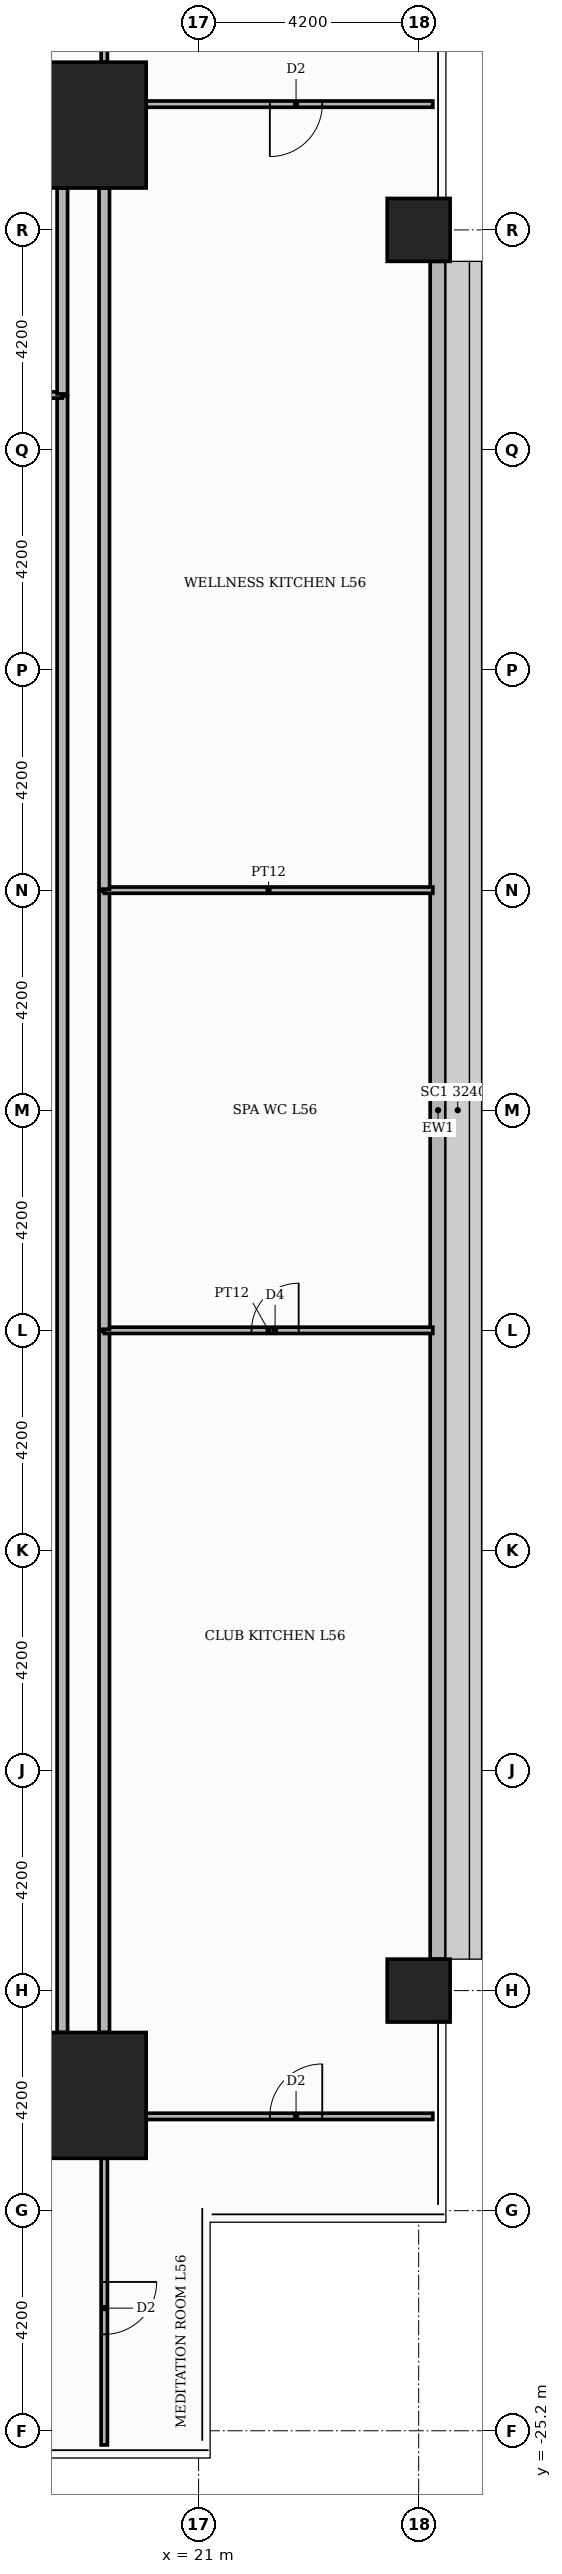
"""IFC4 building model, lengths in metres.
Left out: names, types, materials, properties, quantities, classifications, styles, units other than length and angle.
Written with IfcOpenShell. Run it as: python <this file> out.ifc"""

import sys

from ifc_helpers import new_model, si_unit, direction, frame, frame_2d, origin, origin_2d, place, context, subcontext, project, spatial, rectangle, extrude, element, fill, save


model = new_model("IFC4")
c1 = context("Model", 3, precision=1e-05, world=origin(), true_north=direction((0.0, 1.0)))
c2 = subcontext(c1, "Body", "Model", "MODEL_VIEW")
j1 = project(units=[si_unit("LENGTHUNIT", "METRE"), si_unit("PLANEANGLEUNIT", "RADIAN")], contexts=[c1])
p1 = place(None, origin())
s1 = spatial("IfcSite", under=j1, at=p1, CompositionType="ELEMENT")
p2 = place(p1, origin())
s2 = spatial("IfcBuilding", under=s1, at=p2, CompositionType="ELEMENT")
p3 = place(p2, frame((0.0, 0.0, 235.2)))
s3 = spatial("IfcBuildingStorey", under=s2, at=p3, CompositionType="ELEMENT", Elevation=235.2)
for number, where, z_axis, x_axis in (
    (1, (18.8, 18.8, 0.0), (0.0, 0.0, 1.0), (1.0, 0.0, 0.0)),
    (2, (18.8, -18.8, 0.0), (0.0, 0.0, 1.0), (1.0, 0.0, 0.0)),
):
    element("IfcColumn", number, at=place(p3, frame(where, z_axis=z_axis, x_axis=x_axis)), inside=s3, PredefinedType="COLUMN", context=c2, shape_type="SweptSolid", body=[
        extrude(rectangle(XDim=2.4, YDim=2.4, at=origin_2d()), origin(), (0.0, 0.0, 1.0), 5.4),
    ])
for number, where, z_axis, x_axis in (
    (3, (25.2, 16.8, 0.0), (0.0, 0.0, 1.0), (1.0, 0.0, 0.0)),
    (4, (25.2, -16.8, 0.0), (0.0, 0.0, 1.0), (1.0, 0.0, 0.0)),
):
    element("IfcColumn", number, at=place(p3, frame(where, z_axis=z_axis, x_axis=x_axis)), inside=s3, PredefinedType="COLUMN", context=c2, shape_type="SweptSolid", body=[
        extrude(rectangle(XDim=1.2, YDim=1.2, at=origin_2d()), origin(), (0.0, 0.0, 1.0), 5.4),
    ])
p4 = place(p3, frame((25.57, -16.2, 0.0), z_axis=(0.0, 0.0, 1.0), x_axis=(0.0, 1.0, 0.0)))
e5 = element("IfcWall", 5, at=p4, inside=s3, PredefinedType="STANDARD", context=c2, shape_type="SweptSolid", body=[
    extrude(rectangle(XDim=32.4, YDim=0.3, at=frame_2d((16.2, 0.0))), origin(), (0.0, 0.0, 1.0), 4.98),
])
p5 = place(p3, frame((19.2, -25.47, 0.0), z_axis=(0.0, 0.0, 1.0), x_axis=(0.0, 1.0, 0.0)))
e6 = element("IfcWall", 6, at=p5, inside=s3, PredefinedType="PARTITIONING", context=c2, shape_type="SweptSolid", body=[
    extrude(rectangle(XDim=5.47, YDim=0.12, at=frame_2d((2.735, 0.0))), origin(), (0.0, 0.0, 1.0), 4.98),
])
p6 = place(p5, frame((2.11, 0.0, 0.0)))
e7 = element("IfcOpeningElement", 7, at=p6, cuts=e6, PredefinedType="OPENING", context=c2, shape_type="SweptSolid", body=[
    extrude(rectangle(XDim=1.0, YDim=2.1, at=frame_2d((0.5, 1.05))), frame((0.0, 0.07, 0.0), z_axis=(0.0, -1.0, 0.0), x_axis=(1.0, 0.0, 0.0)), (0.0, 0.0, 1.0), 0.14),
])
p7 = place(p3, frame((20.0, -19.2, 0.0), z_axis=(0.0, 0.0, 1.0), x_axis=(1.0, 0.0, 0.0)))
e8 = element("IfcWall", 8, at=p7, inside=s3, PredefinedType="PARTITIONING", context=c2, shape_type="SweptSolid", body=[
    extrude(rectangle(XDim=5.47, YDim=0.12, at=frame_2d((2.735, 0.0))), origin(), (0.0, 0.0, 1.0), 4.98),
])
p8 = place(p7, frame((2.36, 0.0, 0.0)))
e9 = element("IfcOpeningElement", 9, at=p8, cuts=e8, PredefinedType="OPENING", context=c2, shape_type="SweptSolid", body=[
    extrude(rectangle(XDim=1.0, YDim=2.1, at=frame_2d((0.5, 1.05))), frame((0.0, 0.07, 0.0), z_axis=(0.0, -1.0, 0.0), x_axis=(1.0, 0.0, 0.0)), (0.0, 0.0, 1.0), 0.14),
])
p9 = place(p3, frame((18.4, -17.6, 0.0), z_axis=(0.0, 0.0, 1.0), x_axis=(0.0, 1.0, 0.0)))
e10 = element("IfcWall", 10, at=p9, inside=s3, PredefinedType="PARTITIONING", context=c2, shape_type="SweptSolid", body=[
    extrude(rectangle(XDim=31.23, YDim=0.2, at=frame_2d((15.615, 0.0))), origin(), (0.0, 0.0, 1.0), 4.98),
])
p10 = place(p3, frame((19.2, -17.6, 0.0), z_axis=(0.0, 0.0, 1.0), x_axis=(0.0, 1.0, 0.0)))
e11 = element("IfcWall", 11, at=p10, inside=s3, PredefinedType="PARTITIONING", context=c2, shape_type="SweptSolid", body=[
    extrude(rectangle(XDim=13.38, YDim=0.2, at=frame_2d((6.69, 0.0))), origin(), (0.0, 0.0, 1.0), 4.98),
])
p11 = place(p3, frame((19.2, -4.2, 0.0), z_axis=(0.0, 0.0, 1.0), x_axis=(1.0, 0.0, 0.0)))
e12 = element("IfcWall", 12, at=p11, inside=s3, PredefinedType="PARTITIONING", context=c2, shape_type="SweptSolid", body=[
    extrude(rectangle(XDim=6.27, YDim=0.12, at=frame_2d((3.135, 0.0))), origin(), (0.0, 0.0, 1.0), 4.98),
])
p12 = place(p11, frame((2.81, 0.0, 0.0)))
e13 = element("IfcOpeningElement", 13, at=p12, cuts=e12, PredefinedType="OPENING", context=c2, shape_type="SweptSolid", body=[
    extrude(rectangle(XDim=0.9, YDim=2.1, at=frame_2d((0.45, 1.05))), frame((0.0, 0.07, 0.0), z_axis=(0.0, -1.0, 0.0), x_axis=(1.0, 0.0, 0.0)), (0.0, 0.0, 1.0), 0.14),
])
p13 = place(p3, frame((19.2, -4.18, 0.0), z_axis=(0.0, 0.0, 1.0), x_axis=(0.0, 1.0, 0.0)))
e14 = element("IfcWall", 14, at=p13, inside=s3, PredefinedType="PARTITIONING", context=c2, shape_type="SweptSolid", body=[
    extrude(rectangle(XDim=8.36, YDim=0.2, at=frame_2d((4.18, 0.0))), origin(), (0.0, 0.0, 1.0), 4.98),
])
p14 = place(p3, frame((19.2, 4.2, 0.0), z_axis=(0.0, 0.0, 1.0), x_axis=(1.0, 0.0, 0.0)))
e15 = element("IfcWall", 15, at=p14, inside=s3, PredefinedType="PARTITIONING", context=c2, shape_type="SweptSolid", body=[
    extrude(rectangle(XDim=6.27, YDim=0.12, at=frame_2d((3.135, 0.0))), origin(), (0.0, 0.0, 1.0), 4.98),
])
p15 = place(p3, frame((19.2, 4.22, 0.0), z_axis=(0.0, 0.0, 1.0), x_axis=(0.0, 1.0, 0.0)))
e16 = element("IfcWall", 16, at=p15, inside=s3, PredefinedType="PARTITIONING", context=c2, shape_type="SweptSolid", body=[
    extrude(rectangle(XDim=13.38, YDim=0.2, at=frame_2d((6.69, 0.0))), origin(), (0.0, 0.0, 1.0), 4.98),
])
p16 = place(p3, frame((13.65, 13.65, 0.0), z_axis=(0.0, 0.0, 1.0), x_axis=(1.0, 0.0, 0.0)))
e17 = element("IfcWall", 17, at=p16, inside=s3, PredefinedType="PARTITIONING", context=c2, shape_type="SweptSolid", body=[
    extrude(rectangle(XDim=4.75, YDim=0.12, at=frame_2d((2.375, 0.0))), origin(), (0.0, 0.0, 1.0), 4.98),
])
p17 = place(p3, frame((18.4, 13.67, 0.0), z_axis=(0.0, 0.0, 1.0), x_axis=(0.0, 1.0, 0.0)))
e18 = element("IfcWall", 18, at=p17, inside=s3, PredefinedType="PARTITIONING", context=c2, shape_type="SweptSolid", body=[
    extrude(rectangle(XDim=3.93, YDim=0.2, at=frame_2d((1.965, 0.0))), origin(), (0.0, 0.0, 1.0), 4.98),
])
p18 = place(p3, frame((20.0, 19.2, 0.0), z_axis=(0.0, 0.0, 1.0), x_axis=(1.0, 0.0, 0.0)))
e19 = element("IfcWall", 19, at=p18, inside=s3, PredefinedType="PARTITIONING", context=c2, shape_type="SweptSolid", body=[
    extrude(rectangle(XDim=5.47, YDim=0.12, at=frame_2d((2.735, 0.0))), origin(), (0.0, 0.0, 1.0), 4.98),
])
p19 = place(p18, frame((2.36, 0.0, 0.0)))
e20 = element("IfcOpeningElement", 20, at=p19, cuts=e19, PredefinedType="OPENING", context=c2, shape_type="SweptSolid", body=[
    extrude(rectangle(XDim=1.0, YDim=2.1, at=frame_2d((0.5, 1.05))), frame((0.0, 0.07, 0.0), z_axis=(0.0, -1.0, 0.0), x_axis=(1.0, 0.0, 0.0)), (0.0, 0.0, 1.0), 0.14),
])
p20 = place(p3, frame((19.2, 20.0, 0.0), z_axis=(0.0, 0.0, 1.0), x_axis=(0.0, 1.0, 0.0)))
e21 = element("IfcWall", 21, at=p20, inside=s3, PredefinedType="PARTITIONING", context=c2, shape_type="SweptSolid", body=[
    extrude(rectangle(XDim=5.47, YDim=0.12, at=frame_2d((2.735, 0.0))), origin(), (0.0, 0.0, 1.0), 4.98),
])
p21 = place(p20, frame((2.36, 0.0, 0.0)))
e22 = element("IfcOpeningElement", 22, at=p21, cuts=e21, PredefinedType="OPENING", context=c2, shape_type="SweptSolid", body=[
    extrude(rectangle(XDim=1.0, YDim=2.1, at=frame_2d((0.5, 1.05))), frame((0.0, 0.07, 0.0), z_axis=(0.0, -1.0, 0.0), x_axis=(1.0, 0.0, 0.0)), (0.0, 0.0, 1.0), 0.14),
])
p22 = place(p6, frame((1.0, 0.0, 0.0), z_axis=(0.0, 0.0, 1.0), x_axis=(-1.0, 0.0, 0.0)))
e23 = element("IfcDoor", 23, at=p22, inside=s3, OperationType="SINGLE_SWING_RIGHT", PredefinedType="DOOR", context=c2, shape_type="SweptSolid", body=[
    extrude(rectangle(XDim=1.0, YDim=2.1, at=frame_2d((0.5, 1.05))), frame((0.0, 0.025, 0.0), z_axis=(0.0, -1.0, 0.0), x_axis=(1.0, 0.0, 0.0)), (0.0, 0.0, 1.0), 0.05),
])
fill(e7, e23)
p23 = place(p8, origin())
e24 = element("IfcDoor", 24, at=p23, inside=s3, OperationType="SINGLE_SWING_RIGHT", PredefinedType="DOOR", context=c2, shape_type="SweptSolid", body=[
    extrude(rectangle(XDim=1.0, YDim=2.1, at=frame_2d((0.5, 1.05))), frame((0.0, 0.025, 0.0), z_axis=(0.0, -1.0, 0.0), x_axis=(1.0, 0.0, 0.0)), (0.0, 0.0, 1.0), 0.05),
])
fill(e9, e24)
p24 = place(p12, origin())
e25 = element("IfcDoor", 25, at=p24, inside=s3, OperationType="SINGLE_SWING_RIGHT", PredefinedType="DOOR", context=c2, shape_type="SweptSolid", body=[
    extrude(rectangle(XDim=0.9, YDim=2.1, at=frame_2d((0.45, 1.05))), frame((0.0, 0.025, 0.0), z_axis=(0.0, -1.0, 0.0), x_axis=(1.0, 0.0, 0.0)), (0.0, 0.0, 1.0), 0.05),
])
fill(e13, e25)
p25 = place(p19, frame((1.0, 0.0, 0.0), z_axis=(0.0, 0.0, 1.0), x_axis=(-1.0, 0.0, 0.0)))
e26 = element("IfcDoor", 26, at=p25, inside=s3, OperationType="SINGLE_SWING_LEFT", PredefinedType="DOOR", context=c2, shape_type="SweptSolid", body=[
    extrude(rectangle(XDim=1.0, YDim=2.1, at=frame_2d((0.5, 1.05))), frame((0.0, 0.025, 0.0), z_axis=(0.0, -1.0, 0.0), x_axis=(1.0, 0.0, 0.0)), (0.0, 0.0, 1.0), 0.05),
])
fill(e20, e26)
save(model, sys.argv[1])
